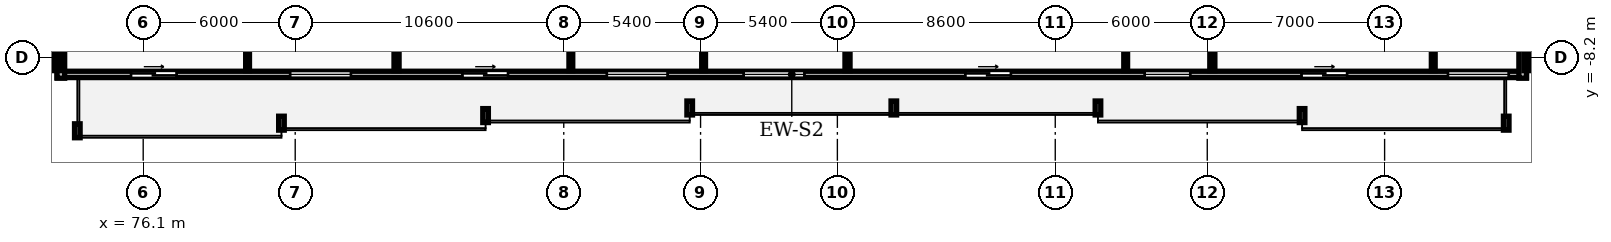
"""IFC4 building model, lengths in metres.
Left out: names, types, materials, properties, quantities, classifications, styles, units other than length and angle.
Written with IfcOpenShell. Run it as: python <this file> out.ifc"""

import sys

from ifc_helpers import new_model, si_unit, direction, frame, frame_2d, origin, place, context, subcontext, project, spatial, rectangle, extrude, element, fill, save


model = new_model("IFC4")
c1 = context("Model", 3, precision=1e-05, world=origin(), true_north=direction((0.0, 1.0)))
c2 = subcontext(c1, "Body", "Model", "MODEL_VIEW")
j1 = project(units=[si_unit("LENGTHUNIT", "METRE"), si_unit("PLANEANGLEUNIT", "RADIAN")], contexts=[c1])
p1 = place(None, origin())
s1 = spatial("IfcSite", under=j1, at=p1, CompositionType="ELEMENT")
p2 = place(p1, origin())
s2 = spatial("IfcBuilding", under=s1, at=p2, CompositionType="ELEMENT")
p3 = place(p2, frame((0.0, 0.0, 80.8)))
s3 = spatial("IfcBuildingStorey", under=s2, at=p3, CompositionType="ELEMENT", Elevation=80.8)
p4 = place(p3, frame((72.7, -8.85, 0.0), z_axis=(0.0, 0.0, 1.0), x_axis=(1.0, 0.0, 0.0)))
e1 = element("IfcWall", 1, at=p4, inside=s3, PredefinedType="STANDARD", context=c2, shape_type="SweptSolid", body=[
    extrude(rectangle(XDim=58.0, YDim=0.25, at=frame_2d((29.0, 0.0))), origin(), (0.0, 0.0, 1.0), 2.97),
])
p5 = place(p4, frame((2.92, 0.0, 0.0)))
e2 = element("IfcOpeningElement", 2, at=p5, cuts=e1, PredefinedType="OPENING", context=c2, shape_type="SweptSolid", body=[
    extrude(rectangle(XDim=1.8, YDim=2.2, at=frame_2d((0.9, 1.1))), frame((0.0, 0.135, 0.0), z_axis=(0.0, -1.0, 0.0), x_axis=(1.0, 0.0, 0.0)), (0.0, 0.0, 1.0), 0.27),
])
p6 = place(p4, frame((9.2, 0.0, 0.85)))
e3 = element("IfcOpeningElement", 3, at=p6, cuts=e1, PredefinedType="OPENING", context=c2, shape_type="SweptSolid", body=[
    extrude(rectangle(XDim=2.4, YDim=1.9, at=frame_2d((1.2, 0.95))), frame((0.0, 0.135, 0.0), z_axis=(0.0, -1.0, 0.0), x_axis=(1.0, 0.0, 0.0)), (0.0, 0.0, 1.0), 0.27),
])
p7 = place(p4, frame((21.7, 0.0, 0.85)))
e4 = element("IfcOpeningElement", 4, at=p7, cuts=e1, PredefinedType="OPENING", context=c2, shape_type="SweptSolid", body=[
    extrude(rectangle(XDim=2.4, YDim=1.9, at=frame_2d((1.2, 0.95))), frame((0.0, 0.135, 0.0), z_axis=(0.0, -1.0, 0.0), x_axis=(1.0, 0.0, 0.0)), (0.0, 0.0, 1.0), 0.27),
])
p8 = place(p4, frame((16.0, 0.0, 0.0)))
e5 = element("IfcOpeningElement", 5, at=p8, cuts=e1, PredefinedType="OPENING", context=c2, shape_type="SweptSolid", body=[
    extrude(rectangle(XDim=1.8, YDim=2.2, at=frame_2d((0.9, 1.1))), frame((0.0, 0.135, 0.0), z_axis=(0.0, -1.0, 0.0), x_axis=(1.0, 0.0, 0.0)), (0.0, 0.0, 1.0), 0.27),
])
p9 = place(p4, frame((27.1, 0.0, 0.85)))
e6 = element("IfcOpeningElement", 6, at=p9, cuts=e1, PredefinedType="OPENING", context=c2, shape_type="SweptSolid", body=[
    extrude(rectangle(XDim=2.4, YDim=1.9, at=frame_2d((1.2, 0.95))), frame((0.0, 0.135, 0.0), z_axis=(0.0, -1.0, 0.0), x_axis=(1.0, 0.0, 0.0)), (0.0, 0.0, 1.0), 0.27),
])
p10 = place(p4, frame((35.85, 0.0, 0.0)))
e7 = element("IfcOpeningElement", 7, at=p10, cuts=e1, PredefinedType="OPENING", context=c2, shape_type="SweptSolid", body=[
    extrude(rectangle(XDim=1.8, YDim=2.2, at=frame_2d((0.9, 1.1))), frame((0.0, 0.135, 0.0), z_axis=(0.0, -1.0, 0.0), x_axis=(1.0, 0.0, 0.0)), (0.0, 0.0, 1.0), 0.27),
])
p11 = place(p4, frame((42.93, 0.0, 0.85)))
e8 = element("IfcOpeningElement", 8, at=p11, cuts=e1, PredefinedType="OPENING", context=c2, shape_type="SweptSolid", body=[
    extrude(rectangle(XDim=1.8, YDim=1.8, at=frame_2d((0.9, 0.9))), frame((0.0, 0.135, 0.0), z_axis=(0.0, -1.0, 0.0), x_axis=(1.0, 0.0, 0.0)), (0.0, 0.0, 1.0), 0.27),
])
p12 = place(p4, frame((49.12, 0.0, 0.0)))
e9 = element("IfcOpeningElement", 9, at=p12, cuts=e1, PredefinedType="OPENING", context=c2, shape_type="SweptSolid", body=[
    extrude(rectangle(XDim=1.8, YDim=2.2, at=frame_2d((0.9, 1.1))), frame((0.0, 0.135, 0.0), z_axis=(0.0, -1.0, 0.0), x_axis=(1.0, 0.0, 0.0)), (0.0, 0.0, 1.0), 0.27),
])
p13 = place(p4, frame((54.9, 0.0, 0.85)))
e10 = element("IfcOpeningElement", 10, at=p13, cuts=e1, PredefinedType="OPENING", context=c2, shape_type="SweptSolid", body=[
    extrude(rectangle(XDim=2.4, YDim=1.9, at=frame_2d((1.2, 0.95))), frame((0.0, 0.135, 0.0), z_axis=(0.0, -1.0, 0.0), x_axis=(1.0, 0.0, 0.0)), (0.0, 0.0, 1.0), 0.27),
])
for number, where, z_axis, x_axis in (
    (11, (130.55, -9.0, 0.0), (0.0, 0.0, 1.0), (0.0, 1.0, 0.0)),
    (12, (72.85, -5.4, 0.0), (0.0, 0.0, 1.0), (0.0, -1.0, 0.0)),
):
    element("IfcWall", number, at=place(p3, frame(where, z_axis=z_axis, x_axis=x_axis)), inside=s3, PredefinedType="STANDARD", context=c2, shape_type="SweptSolid", body=[
        extrude(rectangle(XDim=3.6, YDim=0.3, at=frame_2d((1.8, 0.0))), origin(), (0.0, 0.0, 1.0), 2.97),
    ])
for number, where, z_axis, x_axis in (
    (13, (72.7, -8.7, 0.0), (0.0, 0.0, 1.0), (0.0, 1.0, 0.0)),
    (14, (130.7, -8.7, 0.0), (0.0, 0.0, 1.0), (0.0, 1.0, 0.0)),
    (15, (86.1, -8.7, 0.0), (0.0, 0.0, 1.0), (0.0, 1.0, 0.0)),
):
    element("IfcWall", number, at=place(p3, frame(where, z_axis=z_axis, x_axis=x_axis)), inside=s3, PredefinedType="PARTITIONING", context=c2, shape_type="SweptSolid", body=[
        extrude(rectangle(XDim=24.87, YDim=0.2, at=frame_2d((12.435, 0.0))), origin(), (0.0, 0.0, 1.0), 2.97),
    ])
p14 = place(p3, frame((80.22, -8.7, 0.0), z_axis=(0.0, 0.0, 1.0), x_axis=(0.0, 1.0, 0.0)))
e16 = element("IfcWall", 16, at=p14, inside=s3, PredefinedType="PARTITIONING", context=c2, shape_type="SweptSolid", body=[
    extrude(rectangle(XDim=10.31, YDim=0.15, at=frame_2d((5.155, 0.0))), origin(), (0.0, 0.0, 1.0), 2.97),
])
p15 = place(p14, frame((6.12, 0.0, 0.0)))
e17 = element("IfcOpeningElement", 17, at=p15, cuts=e16, PredefinedType="OPENING", context=c2, shape_type="SweptSolid", body=[
    extrude(rectangle(XDim=0.84, YDim=2.04, at=frame_2d((0.42, 1.02))), frame((0.0, 0.085, 0.0), z_axis=(0.0, -1.0, 0.0), x_axis=(1.0, 0.0, 0.0)), (0.0, 0.0, 1.0), 0.17),
])
p16 = place(p14, frame((8.04, 0.0, 0.0)))
e18 = element("IfcOpeningElement", 18, at=p16, cuts=e16, PredefinedType="OPENING", context=c2, shape_type="SweptSolid", body=[
    extrude(rectangle(XDim=0.84, YDim=2.04, at=frame_2d((0.42, 1.02))), frame((0.0, 0.085, 0.0), z_axis=(0.0, -1.0, 0.0), x_axis=(1.0, 0.0, 0.0)), (0.0, 0.0, 1.0), 0.17),
])
p17 = place(p14, frame((2.001, 0.0, 0.0)))
e19 = element("IfcOpeningElement", 19, at=p17, cuts=e16, PredefinedType="OPENING", context=c2, shape_type="SweptSolid", body=[
    extrude(rectangle(XDim=0.88, YDim=2.06, at=frame_2d((0.44, 1.03))), frame((0.0, 0.085, 0.0), z_axis=(0.0, -1.0, 0.0), x_axis=(1.0, 0.0, 0.0)), (0.0, 0.0, 1.0), 0.17),
])
p18 = place(p3, frame((103.9, -8.7, 0.0), z_axis=(0.0, 0.0, 1.0), x_axis=(0.0, 1.0, 0.0)))
e20 = element("IfcWall", 20, at=p18, inside=s3, PredefinedType="PARTITIONING", context=c2, shape_type="SweptSolid", body=[
    extrude(rectangle(XDim=24.87, YDim=0.2, at=frame_2d((12.435, 0.0))), origin(), (0.0, 0.0, 1.0), 2.97),
])
p19 = place(p3, frame((92.98, -8.7, 0.0), z_axis=(0.0, 0.0, 1.0), x_axis=(0.0, 1.0, 0.0)))
e21 = element("IfcWall", 21, at=p19, inside=s3, PredefinedType="PARTITIONING", context=c2, shape_type="SweptSolid", body=[
    extrude(rectangle(XDim=10.31, YDim=0.15, at=frame_2d((5.155, 0.0))), origin(), (0.0, 0.0, 1.0), 2.97),
])
p20 = place(p19, frame((6.116, 0.0, 0.0)))
e22 = element("IfcOpeningElement", 22, at=p20, cuts=e21, PredefinedType="OPENING", context=c2, shape_type="SweptSolid", body=[
    extrude(rectangle(XDim=0.92, YDim=2.08, at=frame_2d((0.46, 1.04))), frame((0.0, 0.085, 0.0), z_axis=(0.0, -1.0, 0.0), x_axis=(1.0, 0.0, 0.0)), (0.0, 0.0, 1.0), 0.17),
])
p21 = place(p3, frame((98.22, -8.7, 0.0), z_axis=(0.0, 0.0, 1.0), x_axis=(0.0, 1.0, 0.0)))
e23 = element("IfcWall", 23, at=p21, inside=s3, PredefinedType="PARTITIONING", context=c2, shape_type="SweptSolid", body=[
    extrude(rectangle(XDim=7.8, YDim=0.15, at=frame_2d((3.9, 0.0))), origin(), (0.0, 0.0, 1.0), 2.97),
])
p22 = place(p21, frame((6.116, 0.0, 0.0)))
e24 = element("IfcOpeningElement", 24, at=p22, cuts=e23, PredefinedType="OPENING", context=c2, shape_type="SweptSolid", body=[
    extrude(rectangle(XDim=0.92, YDim=2.08, at=frame_2d((0.46, 1.04))), frame((0.0, 0.085, 0.0), z_axis=(0.0, -1.0, 0.0), x_axis=(1.0, 0.0, 0.0)), (0.0, 0.0, 1.0), 0.17),
])
p23 = place(p3, frame((118.3, -8.7, 0.0), z_axis=(0.0, 0.0, 1.0), x_axis=(0.0, 1.0, 0.0)))
e25 = element("IfcWall", 25, at=p23, inside=s3, PredefinedType="PARTITIONING", context=c2, shape_type="SweptSolid", body=[
    extrude(rectangle(XDim=24.87, YDim=0.2, at=frame_2d((12.435, 0.0))), origin(), (0.0, 0.0, 1.0), 2.2),
])
p24 = place(p3, frame((114.88, -8.7, 0.0), z_axis=(0.0, 0.0, 1.0), x_axis=(0.0, 1.0, 0.0)))
e26 = element("IfcWall", 26, at=p24, inside=s3, PredefinedType="PARTITIONING", context=c2, shape_type="SweptSolid", body=[
    extrude(rectangle(XDim=10.31, YDim=0.15, at=frame_2d((5.155, 0.0))), origin(), (0.0, 0.0, 1.0), 2.97),
])
p25 = place(p24, frame((5.55, 0.0, 0.0)))
e27 = element("IfcOpeningElement", 27, at=p25, cuts=e26, PredefinedType="OPENING", context=c2, shape_type="SweptSolid", body=[
    extrude(rectangle(XDim=0.84, YDim=2.04, at=frame_2d((0.42, 1.02))), frame((0.0, 0.085, 0.0), z_axis=(0.0, -1.0, 0.0), x_axis=(1.0, 0.0, 0.0)), (0.0, 0.0, 1.0), 0.17),
])
p26 = place(p24, frame((8.04, 0.0, 0.0)))
e28 = element("IfcOpeningElement", 28, at=p26, cuts=e26, PredefinedType="OPENING", context=c2, shape_type="SweptSolid", body=[
    extrude(rectangle(XDim=0.84, YDim=2.04, at=frame_2d((0.42, 1.02))), frame((0.0, 0.085, 0.0), z_axis=(0.0, -1.0, 0.0), x_axis=(1.0, 0.0, 0.0)), (0.0, 0.0, 1.0), 0.17),
])
p27 = place(p24, frame((3.95, 0.0, 0.0)))
e29 = element("IfcOpeningElement", 29, at=p27, cuts=e26, PredefinedType="OPENING", context=c2, shape_type="SweptSolid", body=[
    extrude(rectangle(XDim=0.88, YDim=2.06, at=frame_2d((0.44, 1.03))), frame((0.0, 0.085, 0.0), z_axis=(0.0, -1.0, 0.0), x_axis=(1.0, 0.0, 0.0)), (0.0, 0.0, 1.0), 0.17),
])
p28 = place(p3, frame((127.02, -8.7, 0.0), z_axis=(0.0, 0.0, 1.0), x_axis=(0.0, 1.0, 0.0)))
e30 = element("IfcWall", 30, at=p28, inside=s3, PredefinedType="PARTITIONING", context=c2, shape_type="SweptSolid", body=[
    extrude(rectangle(XDim=10.31, YDim=0.15, at=frame_2d((5.155, 0.0))), origin(), (0.0, 0.0, 1.0), 2.97),
])
p29 = place(p28, frame((6.12, 0.0, 0.0)))
e31 = element("IfcOpeningElement", 31, at=p29, cuts=e30, PredefinedType="OPENING", context=c2, shape_type="SweptSolid", body=[
    extrude(rectangle(XDim=0.84, YDim=2.04, at=frame_2d((0.42, 1.02))), frame((0.0, 0.085, 0.0), z_axis=(0.0, -1.0, 0.0), x_axis=(1.0, 0.0, 0.0)), (0.0, 0.0, 1.0), 0.17),
])
p30 = place(p28, frame((8.04, 0.0, 0.0)))
e32 = element("IfcOpeningElement", 32, at=p30, cuts=e30, PredefinedType="OPENING", context=c2, shape_type="SweptSolid", body=[
    extrude(rectangle(XDim=0.84, YDim=2.04, at=frame_2d((0.42, 1.02))), frame((0.0, 0.085, 0.0), z_axis=(0.0, -1.0, 0.0), x_axis=(1.0, 0.0, 0.0)), (0.0, 0.0, 1.0), 0.17),
])
p31 = place(p28, frame((2.001, 0.0, 0.0)))
e33 = element("IfcOpeningElement", 33, at=p31, cuts=e30, PredefinedType="OPENING", context=c2, shape_type="SweptSolid", body=[
    extrude(rectangle(XDim=0.88, YDim=2.06, at=frame_2d((0.44, 1.03))), frame((0.0, 0.085, 0.0), z_axis=(0.0, -1.0, 0.0), x_axis=(1.0, 0.0, 0.0)), (0.0, 0.0, 1.0), 0.17),
])
p32 = place(p5, origin())
e34 = element("IfcDoor", 34, at=p32, inside=s3, OperationType="SLIDING_TO_RIGHT", PredefinedType="DOOR", context=c2, shape_type="SweptSolid", body=[
    extrude(rectangle(XDim=1.8, YDim=2.2, at=frame_2d((0.9, 1.1))), frame((0.0, 0.025, 0.0), z_axis=(0.0, -1.0, 0.0), x_axis=(1.0, 0.0, 0.0)), (0.0, 0.0, 1.0), 0.05),
])
fill(e2, e34)
p33 = place(p6, origin())
e35 = element("IfcWindow", 35, at=p33, inside=s3, PartitioningType="DOUBLE_PANEL_VERTICAL", PredefinedType="WINDOW", context=c2, shape_type="SweptSolid", body=[
    extrude(rectangle(XDim=2.4, YDim=1.9, at=frame_2d((1.2, 0.95))), frame((0.0, 0.03, 0.0), z_axis=(0.0, -1.0, 0.0), x_axis=(1.0, 0.0, 0.0)), (0.0, 0.0, 1.0), 0.06),
])
fill(e3, e35)
p34 = place(p7, origin())
e36 = element("IfcWindow", 36, at=p34, inside=s3, PartitioningType="DOUBLE_PANEL_VERTICAL", PredefinedType="WINDOW", context=c2, shape_type="SweptSolid", body=[
    extrude(rectangle(XDim=2.4, YDim=1.9, at=frame_2d((1.2, 0.95))), frame((0.0, 0.03, 0.0), z_axis=(0.0, -1.0, 0.0), x_axis=(1.0, 0.0, 0.0)), (0.0, 0.0, 1.0), 0.06),
])
fill(e4, e36)
p35 = place(p8, origin())
e37 = element("IfcDoor", 37, at=p35, inside=s3, OperationType="SLIDING_TO_RIGHT", PredefinedType="DOOR", context=c2, shape_type="SweptSolid", body=[
    extrude(rectangle(XDim=1.8, YDim=2.2, at=frame_2d((0.9, 1.1))), frame((0.0, 0.025, 0.0), z_axis=(0.0, -1.0, 0.0), x_axis=(1.0, 0.0, 0.0)), (0.0, 0.0, 1.0), 0.05),
])
fill(e5, e37)
p36 = place(p9, origin())
e38 = element("IfcWindow", 38, at=p36, inside=s3, PartitioningType="DOUBLE_PANEL_VERTICAL", PredefinedType="WINDOW", context=c2, shape_type="SweptSolid", body=[
    extrude(rectangle(XDim=2.4, YDim=1.9, at=frame_2d((1.2, 0.95))), frame((0.0, 0.03, 0.0), z_axis=(0.0, -1.0, 0.0), x_axis=(1.0, 0.0, 0.0)), (0.0, 0.0, 1.0), 0.06),
])
fill(e6, e38)
p37 = place(p10, origin())
e39 = element("IfcDoor", 39, at=p37, inside=s3, OperationType="SLIDING_TO_RIGHT", PredefinedType="DOOR", context=c2, shape_type="SweptSolid", body=[
    extrude(rectangle(XDim=1.8, YDim=2.2, at=frame_2d((0.9, 1.1))), frame((0.0, 0.025, 0.0), z_axis=(0.0, -1.0, 0.0), x_axis=(1.0, 0.0, 0.0)), (0.0, 0.0, 1.0), 0.05),
])
fill(e7, e39)
p38 = place(p11, origin())
e40 = element("IfcWindow", 40, at=p38, inside=s3, PartitioningType="SINGLE_PANEL", PredefinedType="WINDOW", context=c2, shape_type="SweptSolid", body=[
    extrude(rectangle(XDim=1.8, YDim=1.8, at=frame_2d((0.9, 0.9))), frame((0.0, 0.03, 0.0), z_axis=(0.0, -1.0, 0.0), x_axis=(1.0, 0.0, 0.0)), (0.0, 0.0, 1.0), 0.06),
])
fill(e8, e40)
p39 = place(p12, origin())
e41 = element("IfcDoor", 41, at=p39, inside=s3, OperationType="SLIDING_TO_RIGHT", PredefinedType="DOOR", context=c2, shape_type="SweptSolid", body=[
    extrude(rectangle(XDim=1.8, YDim=2.2, at=frame_2d((0.9, 1.1))), frame((0.0, 0.025, 0.0), z_axis=(0.0, -1.0, 0.0), x_axis=(1.0, 0.0, 0.0)), (0.0, 0.0, 1.0), 0.05),
])
fill(e9, e41)
p40 = place(p13, origin())
e42 = element("IfcWindow", 42, at=p40, inside=s3, PartitioningType="DOUBLE_PANEL_VERTICAL", PredefinedType="WINDOW", context=c2, shape_type="SweptSolid", body=[
    extrude(rectangle(XDim=2.4, YDim=1.9, at=frame_2d((1.2, 0.95))), frame((0.0, 0.03, 0.0), z_axis=(0.0, -1.0, 0.0), x_axis=(1.0, 0.0, 0.0)), (0.0, 0.0, 1.0), 0.06),
])
fill(e10, e42)
save(model, sys.argv[1])
